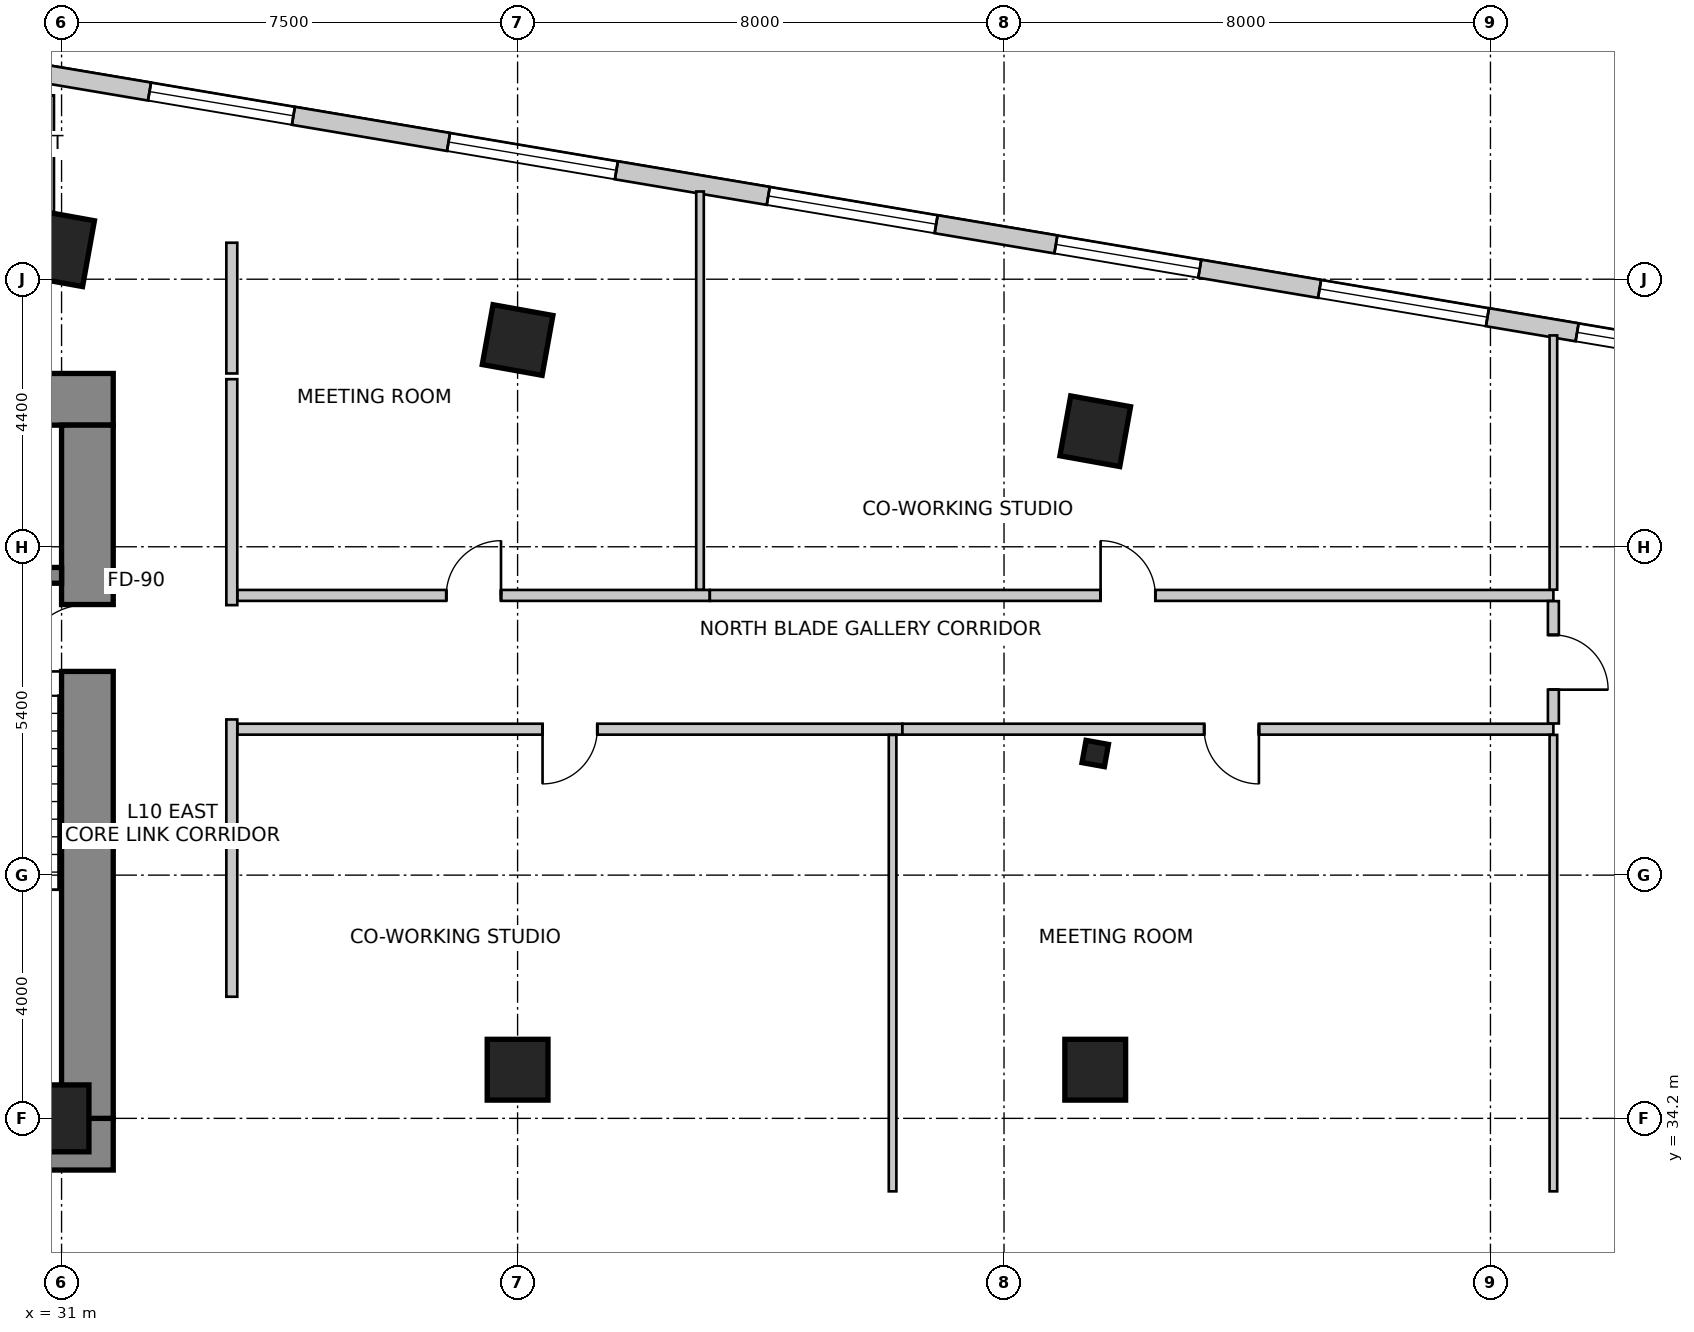
"""IFC4 building model, lengths in metres.
Left out: names, types, materials, properties, quantities, classifications, styles, units other than length and angle.
Written with IfcOpenShell. Run it as: python <this file> out.ifc"""

import sys

from ifc_helpers import new_model, si_unit, direction, frame, frame_2d, origin, origin_2d, place, context, subcontext, project, spatial, rectangle, i_section, extrude, source, transform, mapped, element, fill, save


model = new_model("IFC4")
c1 = context("Model", 3, precision=1e-05, world=origin(), true_north=direction((0.0, 1.0)))
c2 = subcontext(c1, "Body", "Model", "MODEL_VIEW")
j1 = project(units=[si_unit("LENGTHUNIT", "METRE"), si_unit("PLANEANGLEUNIT", "RADIAN")], contexts=[c1])
p1 = place(None, origin())
s1 = spatial("IfcSite", under=j1, at=p1, CompositionType="ELEMENT")
p2 = place(p1, origin())
s2 = spatial("IfcBuilding", under=s1, at=p2, CompositionType="ELEMENT")
p3 = place(p2, frame((0.0, 0.0, 43.0)))
s3 = spatial("IfcBuildingStorey", under=s2, at=p3, CompositionType="ELEMENT", Elevation=43.0)
p4 = place(p3, frame((15.75, 46.025, 0.0), z_axis=(0.0, 0.0, 1.0), x_axis=(1.0, 0.0, 0.0)))
e1 = element("IfcWall", 1, at=p4, inside=s3, PredefinedType="SHEAR", context=c2, shape_type="SweptSolid", body=[
    extrude(rectangle(XDim=16.1, YDim=0.85, at=frame_2d((8.05, 0.0))), origin(), (0.0, 0.0, 1.0), 4.0),
])
p5 = place(p3, frame((15.75, 33.775, 0.0), z_axis=(0.0, 0.0, 1.0), x_axis=(1.0, 0.0, 0.0)))
e2 = element("IfcWall", 2, at=p5, inside=s3, PredefinedType="SHEAR", context=c2, shape_type="SweptSolid", body=[
    extrude(rectangle(XDim=16.1, YDim=0.85, at=frame_2d((8.05, 0.0))), origin(), (0.0, 0.0, 1.0), 4.0),
])
m1 = source(origin(), c2, "Body", "SweptSolid", [
    extrude(rectangle(XDim=1.3, YDim=2.15, at=frame_2d((0.65, 1.075))), frame((0.0, 0.435, 0.0), z_axis=(0.0, -1.0, 0.0), x_axis=(1.0, 0.0, 0.0)), (0.0, 0.0, 1.0), 0.87),
])
p6 = place(p5, frame((10.18, 0.0, 0.0)))
e3 = element("IfcOpeningElement", 3, at=p6, cuts=e2, PredefinedType="OPENING", context=c2, shape_type="MappedRepresentation", body=[
    mapped(m1, transform((0.0, 0.0, 0.0), scale=1.0)),
])
p7 = place(p3, frame((31.425, 34.2, 0.0), z_axis=(0.0, 0.0, 1.0), x_axis=(0.0, 1.0, 0.0)))
e4 = element("IfcWall", 4, at=p7, inside=s3, PredefinedType="SHEAR", context=c2, shape_type="SweptSolid", body=[
    extrude(rectangle(XDim=11.4, YDim=0.85, at=frame_2d((5.7, 0.0))), origin(), (0.0, 0.0, 1.0), 4.0),
])
m2 = source(origin(), c2, "Body", "SweptSolid", [
    extrude(rectangle(XDim=1.1, YDim=2.15, at=frame_2d((0.55, 1.075))), frame((0.0, 0.435, 0.0), z_axis=(0.0, -1.0, 0.0), x_axis=(1.0, 0.0, 0.0)), (0.0, 0.0, 1.0), 0.87),
])
p8 = place(p7, frame((7.35, 0.0, 0.0)))
e5 = element("IfcOpeningElement", 5, at=p8, cuts=e4, PredefinedType="OPENING", context=c2, shape_type="MappedRepresentation", body=[
    mapped(m2, transform((0.0, 0.0, 0.0), scale=1.0)),
])
p9 = place(p3, frame((27.5, 43.13, 0.0), z_axis=(0.0, 0.0, 1.0), x_axis=(1.0, 0.0, 0.0)))
e6 = element("IfcWall", 6, at=p9, inside=s3, PredefinedType="SHEAR", context=c2, shape_type="SweptSolid", body=[
    extrude(rectangle(XDim=3.5, YDim=0.26, at=frame_2d((1.75, 0.0))), origin(), (0.0, 0.0, 1.0), 4.0),
])
m3 = source(origin(), c2, "Body", "SweptSolid", [
    extrude(rectangle(XDim=0.9, YDim=1.1, at=origin_2d()), origin(), (0.0, 0.0, 1.0), 4.0),
])
p10 = place(p3, frame((31.0, 48.5, 0.0), z_axis=(0.0, 0.0, 1.0), x_axis=(0.984195607969, -0.17708474032, 0.0)))
e7 = element("IfcColumn", 7, at=p10, inside=s3, PredefinedType="COLUMN", context=c2, shape_type="MappedRepresentation", body=[
    mapped(m3, transform((0.0, 0.0, 0.0), scale=1.0)),
])
m4 = source(origin(), c2, "Body", "SweptSolid", [
    extrude(rectangle(XDim=1.0, YDim=1.0, at=origin_2d()), origin(), (0.0, 0.0, 1.0), 4.0),
])
for number, where, z_axis, x_axis in (
    (8, (38.5, 47.0, 0.0), (0.0, 0.0, 1.0), (0.984, -0.177, 0.0)),
    (9, (48.0, 45.5, 0.0), (0.0, 0.0, 1.0), (0.984, -0.177, 0.0)),
):
    element("IfcColumn", number, at=place(p3, frame(where, z_axis=z_axis, x_axis=x_axis)), inside=s3, PredefinedType="COLUMN", context=c2, shape_type="MappedRepresentation", body=[
        mapped(m4, transform((0.0, 0.0, 0.0), scale=1.0)),
    ])
p11 = place(p3, frame((31.0, 34.2, 0.0), z_axis=(0.0, 0.0, 1.0), x_axis=(1.0, 0.0, 0.0)))
e10 = element("IfcColumn", 10, at=p11, inside=s3, PredefinedType="COLUMN", context=c2, shape_type="MappedRepresentation", body=[
    mapped(m3, transform((0.0, 0.0, 0.0), scale=1.0)),
])
for number, where, z_axis, x_axis in (
    (11, (38.5, 35.0, 0.0), (0.0, 0.0, 1.0), (1.0, 0.0, 0.0)),
    (12, (48.0, 35.0, 0.0), (0.0, 0.0, 1.0), (1.0, 0.0, 0.0)),
):
    element("IfcColumn", number, at=place(p3, frame(where, z_axis=z_axis, x_axis=x_axis)), inside=s3, PredefinedType="COLUMN", context=c2, shape_type="MappedRepresentation", body=[
        mapped(m4, transform((0.0, 0.0, 0.0), scale=1.0)),
    ])
m5 = source(origin(), c2, "Body", "SweptSolid", [
    extrude(i_section(OverallWidth=0.374, OverallDepth=0.372, WebThickness=0.016, FlangeThickness=0.026, FilletRadius=0.015, at=origin_2d()), origin(), (0.0, 0.0, 1.0), 4.0),
])
p12 = place(p3, frame((48.0, 40.2, 0.0), z_axis=(0.0, 0.0, 1.0), x_axis=(0.984195607969, -0.17708474032, 0.0)))
e13 = element("IfcColumn", 13, at=p12, inside=s3, PredefinedType="COLUMN", context=c2, shape_type="MappedRepresentation", body=[
    mapped(m5, transform((0.0, 0.0, 0.0), scale=1.0)),
])
p13 = place(p3, frame((58.761, 46.648, 0.0), z_axis=(0.0, 0.0, 1.0), x_axis=(-0.98607502735, 0.166301053624, 0.0)))
e14 = element("IfcWall", 14, at=p13, inside=s3, PredefinedType="SOLIDWALL", context=c2, shape_type="SweptSolid", body=[
    extrude(rectangle(XDim=37.397, YDim=0.3, at=frame_2d((18.699, 0.0))), origin(), (0.0, 0.0, 1.0), 3.75),
])
m6 = source(origin(), c2, "Body", "SweptSolid", [
    extrude(rectangle(XDim=2.4, YDim=2.2, at=frame_2d((1.2, 1.1))), frame((0.0, 0.16, 0.0), z_axis=(0.0, -1.0, 0.0), x_axis=(1.0, 0.0, 0.0)), (0.0, 0.0, 1.0), 0.32),
])
p14 = place(p13, frame((0.476, 0.0, 0.85)))
e15 = element("IfcOpeningElement", 15, at=p14, cuts=e14, PredefinedType="OPENING", context=c2, shape_type="MappedRepresentation", body=[
    mapped(m6, transform((0.0, 0.0, 0.0), scale=1.0)),
])
m7 = source(origin(), c2, "Body", "SweptSolid", [
    extrude(rectangle(XDim=2.8, YDim=2.4, at=frame_2d((1.4, 1.2))), frame((0.0, 0.16, 0.0), z_axis=(0.0, -1.0, 0.0), x_axis=(1.0, 0.0, 0.0)), (0.0, 0.0, 1.0), 0.32),
])
p15 = place(p13, frame((4.371, 0.0, 0.85)))
e16 = element("IfcOpeningElement", 16, at=p15, cuts=e14, PredefinedType="OPENING", context=c2, shape_type="MappedRepresentation", body=[
    mapped(m7, transform((0.0, 0.0, 0.0), scale=1.0)),
])
p16 = place(p13, frame((9.169, 0.0, 0.85)))
e17 = element("IfcOpeningElement", 17, at=p16, cuts=e14, PredefinedType="OPENING", context=c2, shape_type="MappedRepresentation", body=[
    mapped(m6, transform((0.0, 0.0, 0.0), scale=1.0)),
])
p17 = place(p13, frame((13.566, 0.0, 0.85)))
e18 = element("IfcOpeningElement", 18, at=p17, cuts=e14, PredefinedType="OPENING", context=c2, shape_type="MappedRepresentation", body=[
    mapped(m7, transform((0.0, 0.0, 0.0), scale=1.0)),
])
p18 = place(p13, frame((18.899, 0.0, 0.85)))
e19 = element("IfcOpeningElement", 19, at=p18, cuts=e14, PredefinedType="OPENING", context=c2, shape_type="MappedRepresentation", body=[
    mapped(m7, transform((0.0, 0.0, 0.0), scale=1.0)),
])
p19 = place(p13, frame((24.286, 0.0, 0.85)))
e20 = element("IfcOpeningElement", 20, at=p19, cuts=e14, PredefinedType="OPENING", context=c2, shape_type="MappedRepresentation", body=[
    mapped(m6, transform((0.0, 0.0, 0.0), scale=1.0)),
])
p20 = place(p13, frame((29.757, 0.0, 0.85)))
e21 = element("IfcOpeningElement", 21, at=p20, cuts=e14, PredefinedType="OPENING", context=c2, shape_type="MappedRepresentation", body=[
    mapped(m7, transform((0.0, 0.0, 0.0), scale=1.0)),
])
p21 = place(p13, frame((34.256, 0.0, 0.85)))
e22 = element("IfcOpeningElement", 22, at=p21, cuts=e14, PredefinedType="OPENING", context=c2, shape_type="MappedRepresentation", body=[
    mapped(m7, transform((0.0, 0.0, 0.0), scale=1.0)),
])
p22 = place(p3, frame((25.362, 48.6, 0.0), z_axis=(0.0, 0.0, 1.0), x_axis=(1.0, 0.0, 0.0)))
e23 = element("IfcWall", 23, at=p22, inside=s3, PredefinedType="PARTITIONING", context=c2, shape_type="SweptSolid", body=[
    extrude(rectangle(XDim=5.598, YDim=0.18, at=frame_2d((2.799, 0.0))), origin(), (0.0, 0.0, 1.0), 2.892),
])
m8 = source(origin(), c2, "Body", "SweptSolid", [
    extrude(rectangle(XDim=0.9, YDim=2.15, at=frame_2d((0.45, 1.075))), frame((0.0, 0.1, 0.0), z_axis=(0.0, -1.0, 0.0), x_axis=(1.0, 0.0, 0.0)), (0.0, 0.0, 1.0), 0.2),
])
p23 = place(p22, frame((2.349, 0.0, 0.0)))
e24 = element("IfcOpeningElement", 24, at=p23, cuts=e23, PredefinedType="OPENING", context=c2, shape_type="MappedRepresentation", body=[
    mapped(m8, transform((0.0, 0.0, 0.0), scale=1.0)),
])
p24 = place(p3, frame((33.8, 48.6, 0.0), z_axis=(0.0, 0.0, 1.0), x_axis=(0.0, -1.0, 0.0)))
e25 = element("IfcWall", 25, at=p24, inside=s3, PredefinedType="PARTITIONING", context=c2, shape_type="SweptSolid", body=[
    extrude(rectangle(XDim=2.15, YDim=0.18, at=frame_2d((1.075, 0.0))), origin(), (0.0, 0.0, 1.0), 2.892),
])
p25 = place(p3, frame((33.8, 40.76, 0.0), z_axis=(0.0, 0.0, 1.0), x_axis=(0.0, -1.0, 0.0)))
e26 = element("IfcWall", 26, at=p25, inside=s3, PredefinedType="PARTITIONING", context=c2, shape_type="SweptSolid", body=[
    extrude(rectangle(XDim=4.56, YDim=0.18, at=frame_2d((2.28, 0.0))), origin(), (0.0, 0.0, 1.0), 3.75),
])
p26 = place(p3, frame((33.8, 46.356, 0.0), z_axis=(0.0, 0.0, 1.0), x_axis=(0.0, -1.0, 0.0)))
e27 = element("IfcWall", 27, at=p26, inside=s3, PredefinedType="PARTITIONING", context=c2, shape_type="SweptSolid", body=[
    extrude(rectangle(XDim=3.716, YDim=0.18, at=frame_2d((1.858, 0.0))), origin(), (0.0, 0.0, 1.0), 3.279),
])
p27 = place(p3, frame((44.827, 40.6, 0.0), z_axis=(0.0, 0.0, 1.0), x_axis=(-1.0, 0.0, 0.0)))
e28 = element("IfcWall", 28, at=p27, inside=s3, PredefinedType="PARTITIONING", context=c2, shape_type="SweptSolid", body=[
    extrude(rectangle(XDim=10.933, YDim=0.18, at=frame_2d((5.466, 0.0))), origin(), (0.0, 0.0, 1.0), 3.125),
])
p28 = place(p27, frame((5.017, 0.0, 0.0)))
e29 = element("IfcOpeningElement", 29, at=p28, cuts=e28, PredefinedType="OPENING", context=c2, shape_type="MappedRepresentation", body=[
    mapped(m8, transform((0.0, 0.0, 0.0), scale=1.0)),
])
p29 = place(p3, frame((55.535, 40.6, 0.0), z_axis=(0.0, 0.0, 1.0), x_axis=(-1.0, 0.0, 0.0)))
e30 = element("IfcWall", 30, at=p29, inside=s3, PredefinedType="PARTITIONING", context=c2, shape_type="SweptSolid", body=[
    extrude(rectangle(XDim=10.706, YDim=0.18, at=frame_2d((5.353, 0.0))), origin(), (0.0, 0.0, 1.0), 3.125),
])
p30 = place(p29, frame((4.843, 0.0, 0.0)))
e31 = element("IfcOpeningElement", 31, at=p30, cuts=e30, PredefinedType="OPENING", context=c2, shape_type="MappedRepresentation", body=[
    mapped(m8, transform((0.0, 0.0, 0.0), scale=1.0)),
])
p31 = place(p3, frame((33.894, 42.8, 0.0), z_axis=(0.0, 0.0, 1.0), x_axis=(1.0, 0.0, 0.0)))
e32 = element("IfcWall", 32, at=p31, inside=s3, PredefinedType="PARTITIONING", context=c2, shape_type="SweptSolid", body=[
    extrude(rectangle(XDim=7.766, YDim=0.18, at=frame_2d((3.883, 0.0))), origin(), (0.0, 0.0, 1.0), 3.125),
])
p32 = place(p31, frame((3.433, 0.0, 0.0)))
e33 = element("IfcOpeningElement", 33, at=p32, cuts=e32, PredefinedType="OPENING", context=c2, shape_type="MappedRepresentation", body=[
    mapped(m8, transform((0.0, 0.0, 0.0), scale=1.0)),
])
p33 = place(p3, frame((41.662, 42.8, 0.0), z_axis=(0.0, 0.0, 1.0), x_axis=(1.0, 0.0, 0.0)))
e34 = element("IfcWall", 34, at=p33, inside=s3, PredefinedType="PARTITIONING", context=c2, shape_type="SweptSolid", body=[
    extrude(rectangle(XDim=13.873, YDim=0.18, at=frame_2d((6.937, 0.0))), origin(), (0.0, 0.0, 1.0), 3.125),
])
p34 = place(p33, frame((6.426, 0.0, 0.0)))
e35 = element("IfcOpeningElement", 35, at=p34, cuts=e34, PredefinedType="OPENING", context=c2, shape_type="MappedRepresentation", body=[
    mapped(m8, transform((0.0, 0.0, 0.0), scale=1.0)),
])
p35 = place(p3, frame((55.535, 42.706, 0.0), z_axis=(0.0, 0.0, 1.0), x_axis=(0.0, -1.0, 0.0)))
e36 = element("IfcWall", 36, at=p35, inside=s3, PredefinedType="PARTITIONING", context=c2, shape_type="SweptSolid", body=[
    extrude(rectangle(XDim=2.012, YDim=0.18, at=frame_2d((1.006, 0.0))), origin(), (0.0, 0.0, 1.0), 3.75),
])
p36 = place(p35, frame((0.556, 0.0, 0.0)))
e37 = element("IfcOpeningElement", 37, at=p36, cuts=e36, PredefinedType="OPENING", context=c2, shape_type="MappedRepresentation", body=[
    mapped(m8, transform((0.0, 0.0, 0.0), scale=1.0)),
])
p37 = place(p3, frame((44.667, 40.506, 0.0), z_axis=(0.0, 0.0, 1.0), x_axis=(0.0, -1.0, 0.0)))
e38 = element("IfcWall", 38, at=p37, inside=s3, PredefinedType="PARTITIONING", context=c2, shape_type="SweptSolid", body=[
    extrude(rectangle(XDim=7.506, YDim=0.125, at=frame_2d((3.753, 0.0))), origin(), (0.0, 0.0, 1.0), 2.892),
])
p38 = place(p3, frame((55.535, 40.506, 0.0), z_axis=(0.0, 0.0, 1.0), x_axis=(0.0, -1.0, 0.0)))
e39 = element("IfcWall", 39, at=p38, inside=s3, PredefinedType="PARTITIONING", context=c2, shape_type="SweptSolid", body=[
    extrude(rectangle(XDim=7.506, YDim=0.125, at=frame_2d((3.753, 0.0))), origin(), (0.0, 0.0, 1.0), 3.75),
])
p39 = place(p3, frame((41.5, 49.443, 0.0), z_axis=(0.0, 0.0, 1.0), x_axis=(0.0, -1.0, 0.0)))
e40 = element("IfcWall", 40, at=p39, inside=s3, PredefinedType="PARTITIONING", context=c2, shape_type="SweptSolid", body=[
    extrude(rectangle(XDim=6.549, YDim=0.125, at=frame_2d((3.274, 0.0))), origin(), (0.0, 0.0, 1.0), 2.892),
])
p40 = place(p3, frame((55.535, 47.076, 0.0), z_axis=(0.0, 0.0, 1.0), x_axis=(0.0, -1.0, 0.0)))
e41 = element("IfcWall", 41, at=p40, inside=s3, PredefinedType="PARTITIONING", context=c2, shape_type="SweptSolid", body=[
    extrude(rectangle(XDim=4.182, YDim=0.125, at=frame_2d((2.091, 0.0))), origin(), (0.0, 0.0, 1.0), 3.75),
])
p41 = place(p3, frame((30.8, 51.024, 0.0), z_axis=(0.0, 0.0, 1.0), x_axis=(0.0, -1.0, 0.0)))
e42 = element("IfcWall", 42, at=p41, inside=s3, PredefinedType="PARTITIONING", context=c2, shape_type="SweptSolid", body=[
    extrude(rectangle(XDim=2.204, YDim=0.15, at=frame_2d((1.102, 0.0))), origin(), (0.0, 0.0, 1.0), 3.75),
])
m9 = source(origin(), c2, "Body", "SweptSolid", [
    extrude(rectangle(XDim=2.4, YDim=2.2, at=frame_2d((1.2, 1.1))), frame((0.0, -0.015, 0.0), z_axis=(0.0, -1.0, 0.0), x_axis=(1.0, 0.0, 0.0)), (0.0, 0.0, 1.0), 0.06),
])
p42 = place(p14, origin())
e43 = element("IfcWindow", 43, at=p42, inside=s3, PartitioningType="SINGLE_PANEL", PredefinedType="WINDOW", context=c2, shape_type="MappedRepresentation", body=[
    mapped(m9, transform((0.0, 0.0, 0.0), scale=1.0)),
])
fill(e15, e43)
m10 = source(origin(), c2, "Body", "SweptSolid", [
    extrude(rectangle(XDim=2.8, YDim=2.4, at=frame_2d((1.4, 1.2))), frame((0.0, -0.015, 0.0), z_axis=(0.0, -1.0, 0.0), x_axis=(1.0, 0.0, 0.0)), (0.0, 0.0, 1.0), 0.06),
])
p43 = place(p15, origin())
e44 = element("IfcWindow", 44, at=p43, inside=s3, PartitioningType="SINGLE_PANEL", PredefinedType="WINDOW", context=c2, shape_type="MappedRepresentation", body=[
    mapped(m10, transform((0.0, 0.0, 0.0), scale=1.0)),
])
fill(e16, e44)
p44 = place(p16, origin())
e45 = element("IfcWindow", 45, at=p44, inside=s3, PartitioningType="SINGLE_PANEL", PredefinedType="WINDOW", context=c2, shape_type="MappedRepresentation", body=[
    mapped(m9, transform((0.0, 0.0, 0.0), scale=1.0)),
])
fill(e17, e45)
p45 = place(p17, origin())
e46 = element("IfcWindow", 46, at=p45, inside=s3, PartitioningType="SINGLE_PANEL", PredefinedType="WINDOW", context=c2, shape_type="MappedRepresentation", body=[
    mapped(m10, transform((0.0, 0.0, 0.0), scale=1.0)),
])
fill(e18, e46)
p46 = place(p18, origin())
e47 = element("IfcWindow", 47, at=p46, inside=s3, PartitioningType="SINGLE_PANEL", PredefinedType="WINDOW", context=c2, shape_type="MappedRepresentation", body=[
    mapped(m10, transform((0.0, 0.0, 0.0), scale=1.0)),
])
fill(e19, e47)
p47 = place(p19, origin())
e48 = element("IfcWindow", 48, at=p47, inside=s3, PartitioningType="SINGLE_PANEL", PredefinedType="WINDOW", context=c2, shape_type="MappedRepresentation", body=[
    mapped(m9, transform((0.0, 0.0, 0.0), scale=1.0)),
])
fill(e20, e48)
m11 = source(origin(), c2, "Body", "SweptSolid", [
    extrude(rectangle(XDim=1.1, YDim=2.15, at=frame_2d((0.55, 1.075))), frame((0.0, 0.025, 0.0), z_axis=(0.0, -1.0, 0.0), x_axis=(1.0, 0.0, 0.0)), (0.0, 0.0, 1.0), 0.05),
])
p48 = place(p8, origin())
e49 = element("IfcDoor", 49, at=p48, inside=s3, OperationType="SINGLE_SWING_LEFT", PredefinedType="DOOR", context=c2, shape_type="MappedRepresentation", body=[
    mapped(m11, transform((0.0, 0.0, 0.0), scale=1.0)),
])
fill(e5, e49)
m12 = source(origin(), c2, "Body", "SweptSolid", [
    extrude(rectangle(XDim=0.9, YDim=2.15, at=frame_2d((0.45, 1.075))), frame((0.0, 0.025, 0.0), z_axis=(0.0, -1.0, 0.0), x_axis=(1.0, 0.0, 0.0)), (0.0, 0.0, 1.0), 0.05),
])
p49 = place(p28, origin())
e50 = element("IfcDoor", 50, at=p49, inside=s3, OperationType="SINGLE_SWING_RIGHT", PredefinedType="DOOR", context=c2, shape_type="MappedRepresentation", body=[
    mapped(m12, transform((0.0, 0.0, 0.0), scale=1.0)),
])
fill(e29, e50)
p50 = place(p30, origin())
e51 = element("IfcDoor", 51, at=p50, inside=s3, OperationType="SINGLE_SWING_LEFT", PredefinedType="DOOR", context=c2, shape_type="MappedRepresentation", body=[
    mapped(m12, transform((0.0, 0.0, 0.0), scale=1.0)),
])
fill(e31, e51)
p51 = place(p32, origin())
e52 = element("IfcDoor", 52, at=p51, inside=s3, OperationType="SINGLE_SWING_RIGHT", PredefinedType="DOOR", context=c2, shape_type="MappedRepresentation", body=[
    mapped(m12, transform((0.0, 0.0, 0.0), scale=1.0)),
])
fill(e33, e52)
p52 = place(p34, origin())
e53 = element("IfcDoor", 53, at=p52, inside=s3, OperationType="SINGLE_SWING_LEFT", PredefinedType="DOOR", context=c2, shape_type="MappedRepresentation", body=[
    mapped(m12, transform((0.0, 0.0, 0.0), scale=1.0)),
])
fill(e35, e53)
p53 = place(p36, origin())
e54 = element("IfcDoor", 54, at=p53, inside=s3, OperationType="SINGLE_SWING_RIGHT", PredefinedType="DOOR", context=c2, shape_type="MappedRepresentation", body=[
    mapped(m12, transform((0.0, 0.0, 0.0), scale=1.0)),
])
fill(e37, e54)
save(model, sys.argv[1])
